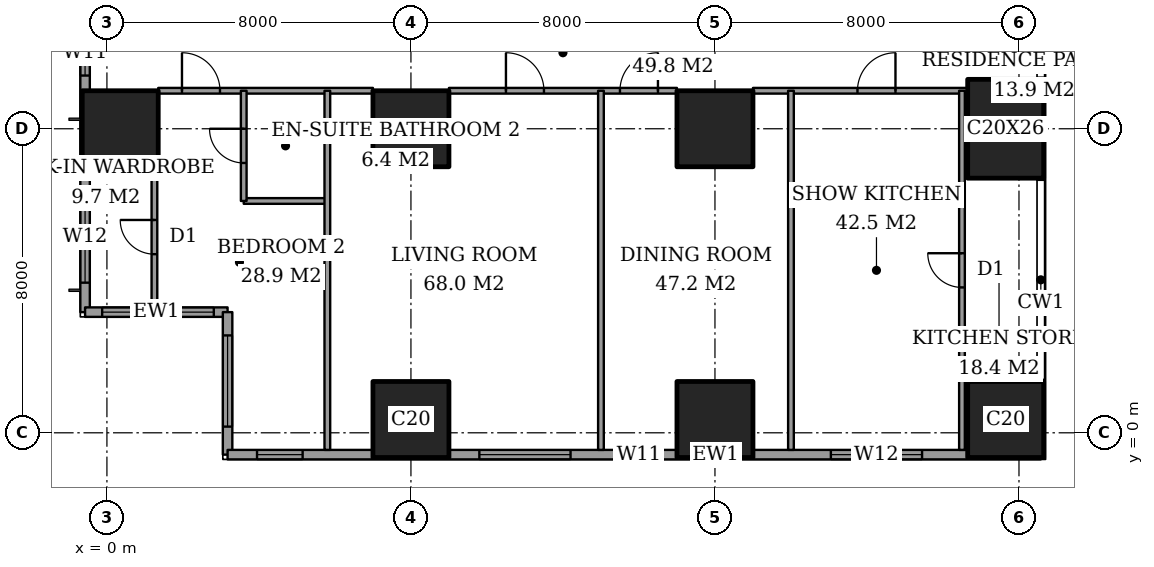
"""IFC4 building model, lengths in metres.
Left out: names, types, materials, properties, quantities, classifications, styles, units other than length and angle.
Written with IfcOpenShell. Run it as: python <this file> out.ifc"""

import sys

from ifc_helpers import new_model, si_unit, direction, frame, frame_2d, origin, origin_2d, place, context, subcontext, project, spatial, rectangle, extrude, element, fill, save


model = new_model("IFC4")
c1 = context("Model", 3, precision=1e-05, world=origin(), true_north=direction((0.0, 1.0)))
c2 = subcontext(c1, "Body", "Model", "MODEL_VIEW")
j1 = project(units=[si_unit("LENGTHUNIT", "METRE"), si_unit("PLANEANGLEUNIT", "RADIAN")], contexts=[c1])
p1 = place(None, origin())
s1 = spatial("IfcSite", under=j1, at=p1, CompositionType="ELEMENT")
p2 = place(p1, origin())
s2 = spatial("IfcBuilding", under=s1, at=p2, CompositionType="ELEMENT")
p3 = place(p2, frame((0.0, 0.0, 146.6)))
s3 = spatial("IfcBuildingStorey", under=s2, at=p3, CompositionType="ELEMENT", Elevation=146.6)
for number, where, z_axis, x_axis in (
    (1, (0.35, 8.0, 0.0), (0.0, 0.0, 1.0), (1.0, 0.0, 0.0)),
    (2, (8.0, 0.35, 0.0), (0.0, 0.0, 1.0), (1.0, 0.0, 0.0)),
    (3, (8.0, 8.0, 0.0), (0.0, 0.0, 1.0), (1.0, 0.0, 0.0)),
    (4, (16.0, 0.35, 0.0), (0.0, 0.0, 1.0), (1.0, 0.0, 0.0)),
    (5, (16.0, 8.0, 0.0), (0.0, 0.0, 1.0), (1.0, 0.0, 0.0)),
    (6, (23.65, 0.35, 0.0), (0.0, 0.0, 1.0), (1.0, 0.0, 0.0)),
):
    element("IfcColumn", number, at=place(p3, frame(where, z_axis=z_axis, x_axis=x_axis)), inside=s3, PredefinedType="COLUMN", context=c2, shape_type="SweptSolid", body=[
        extrude(rectangle(XDim=2.0, YDim=2.0, at=origin_2d()), origin(), (0.0, 0.0, 1.0), 3.6),
    ])
p4 = place(p3, frame((23.65, 8.0, 0.0), z_axis=(0.0, 0.0, 1.0), x_axis=(1.0, 0.0, 0.0)))
e7 = element("IfcColumn", 7, at=p4, inside=s3, PredefinedType="COLUMN", context=c2, shape_type="SweptSolid", body=[
    extrude(rectangle(XDim=2.0, YDim=2.6, at=origin_2d()), origin(), (0.0, 0.0, 1.0), 3.6),
])
p5 = place(p3, frame((-0.575, 44.825, 0.0), z_axis=(0.0, 0.0, 1.0), x_axis=(0.0, -1.0, 0.0)))
e8 = element("IfcWall", 8, at=p5, inside=s3, PredefinedType="SOLIDWALL", context=c2, shape_type="SweptSolid", body=[
    extrude(rectangle(XDim=41.65, YDim=0.25, at=frame_2d((20.825, 0.0))), origin(), (0.0, 0.0, 1.0), 3.6),
])
p6 = place(p5, frame((0.775, 0.0, 0.4)))
e9 = element("IfcOpeningElement", 9, at=p6, cuts=e8, PredefinedType="OPENING", context=c2, shape_type="SweptSolid", body=[
    extrude(rectangle(XDim=2.4, YDim=2.2, at=frame_2d((1.2, 1.1))), frame((0.0, 0.135, 0.0), z_axis=(0.0, -1.0, 0.0), x_axis=(1.0, 0.0, 0.0)), (0.0, 0.0, 1.0), 0.27),
])
p7 = place(p5, frame((6.1, 0.0, 0.4)))
e10 = element("IfcOpeningElement", 10, at=p7, cuts=e8, PredefinedType="OPENING", context=c2, shape_type="SweptSolid", body=[
    extrude(rectangle(XDim=1.2, YDim=2.2, at=frame_2d((0.6, 1.1))), frame((0.0, 0.135, 0.0), z_axis=(0.0, -1.0, 0.0), x_axis=(1.0, 0.0, 0.0)), (0.0, 0.0, 1.0), 0.27),
])
p8 = place(p5, frame((8.425, 0.0, 0.4)))
e11 = element("IfcOpeningElement", 11, at=p8, cuts=e8, PredefinedType="OPENING", context=c2, shape_type="SweptSolid", body=[
    extrude(rectangle(XDim=2.4, YDim=2.2, at=frame_2d((1.2, 1.1))), frame((0.0, 0.135, 0.0), z_axis=(0.0, -1.0, 0.0), x_axis=(1.0, 0.0, 0.0)), (0.0, 0.0, 1.0), 0.27),
])
p9 = place(p5, frame((15.625, 0.0, 0.4)))
e12 = element("IfcOpeningElement", 12, at=p9, cuts=e8, PredefinedType="OPENING", context=c2, shape_type="SweptSolid", body=[
    extrude(rectangle(XDim=2.4, YDim=2.2, at=frame_2d((1.2, 1.1))), frame((0.0, 0.135, 0.0), z_axis=(0.0, -1.0, 0.0), x_axis=(1.0, 0.0, 0.0)), (0.0, 0.0, 1.0), 0.27),
])
p10 = place(p5, frame((23.625, 0.0, 0.4)))
e13 = element("IfcOpeningElement", 13, at=p10, cuts=e8, PredefinedType="OPENING", context=c2, shape_type="SweptSolid", body=[
    extrude(rectangle(XDim=2.4, YDim=2.2, at=frame_2d((1.2, 1.1))), frame((0.0, 0.135, 0.0), z_axis=(0.0, -1.0, 0.0), x_axis=(1.0, 0.0, 0.0)), (0.0, 0.0, 1.0), 0.27),
])
p11 = place(p5, frame((30.625, 0.0, 0.4)))
e14 = element("IfcOpeningElement", 14, at=p11, cuts=e8, PredefinedType="OPENING", context=c2, shape_type="SweptSolid", body=[
    extrude(rectangle(XDim=2.4, YDim=2.2, at=frame_2d((1.2, 1.1))), frame((0.0, 0.135, 0.0), z_axis=(0.0, -1.0, 0.0), x_axis=(1.0, 0.0, 0.0)), (0.0, 0.0, 1.0), 0.27),
])
p12 = place(p5, frame((34.225, 0.0, 0.4)))
e15 = element("IfcOpeningElement", 15, at=p12, cuts=e8, PredefinedType="OPENING", context=c2, shape_type="SweptSolid", body=[
    extrude(rectangle(XDim=1.2, YDim=2.2, at=frame_2d((0.6, 1.1))), frame((0.0, 0.135, 0.0), z_axis=(0.0, -1.0, 0.0), x_axis=(1.0, 0.0, 0.0)), (0.0, 0.0, 1.0), 0.27),
])
p13 = place(p5, frame((38.475, 0.0, 0.4)))
e16 = element("IfcOpeningElement", 16, at=p13, cuts=e8, PredefinedType="OPENING", context=c2, shape_type="SweptSolid", body=[
    extrude(rectangle(XDim=2.4, YDim=2.2, at=frame_2d((1.2, 1.1))), frame((0.0, 0.135, 0.0), z_axis=(0.0, -1.0, 0.0), x_axis=(1.0, 0.0, 0.0)), (0.0, 0.0, 1.0), 0.27),
])
p14 = place(p3, frame((-0.575, 3.175, 0.0), z_axis=(0.0, 0.0, 1.0), x_axis=(1.0, 0.0, 0.0)))
e17 = element("IfcWall", 17, at=p14, inside=s3, PredefinedType="SOLIDWALL", context=c2, shape_type="SweptSolid", body=[
    extrude(rectangle(XDim=3.75, YDim=0.25, at=frame_2d((1.875, 0.0))), origin(), (0.0, 0.0, 1.0), 3.6),
])
p15 = place(p14, frame((0.45, 0.0, 0.4)))
e18 = element("IfcOpeningElement", 18, at=p15, cuts=e17, PredefinedType="OPENING", context=c2, shape_type="SweptSolid", body=[
    extrude(rectangle(XDim=1.2, YDim=2.2, at=frame_2d((0.6, 1.1))), frame((0.0, 0.135, 0.0), z_axis=(0.0, -1.0, 0.0), x_axis=(1.0, 0.0, 0.0)), (0.0, 0.0, 1.0), 0.27),
])
p16 = place(p14, frame((2.188, 0.0, 0.4)))
e19 = element("IfcOpeningElement", 19, at=p16, cuts=e17, PredefinedType="OPENING", context=c2, shape_type="SweptSolid", body=[
    extrude(rectangle(XDim=1.2, YDim=2.2, at=frame_2d((0.6, 1.1))), frame((0.0, 0.135, 0.0), z_axis=(0.0, -1.0, 0.0), x_axis=(1.0, 0.0, 0.0)), (0.0, 0.0, 1.0), 0.27),
])
p17 = place(p3, frame((3.175, 3.175, 0.0), z_axis=(0.0, 0.0, 1.0), x_axis=(0.0, -1.0, 0.0)))
e20 = element("IfcWall", 20, at=p17, inside=s3, PredefinedType="SOLIDWALL", context=c2, shape_type="SweptSolid", body=[
    extrude(rectangle(XDim=3.75, YDim=0.25, at=frame_2d((1.875, 0.0))), origin(), (0.0, 0.0, 1.0), 3.6),
])
p18 = place(p17, frame((0.613, 0.0, 0.4)))
e21 = element("IfcOpeningElement", 21, at=p18, cuts=e20, PredefinedType="OPENING", context=c2, shape_type="SweptSolid", body=[
    extrude(rectangle(XDim=2.4, YDim=2.2, at=frame_2d((1.2, 1.1))), frame((0.0, 0.135, 0.0), z_axis=(0.0, -1.0, 0.0), x_axis=(1.0, 0.0, 0.0)), (0.0, 0.0, 1.0), 0.27),
])
p19 = place(p3, frame((3.175, -0.575, 0.0), z_axis=(0.0, 0.0, 1.0), x_axis=(1.0, 0.0, 0.0)))
e22 = element("IfcWall", 22, at=p19, inside=s3, PredefinedType="SOLIDWALL", context=c2, shape_type="SweptSolid", body=[
    extrude(rectangle(XDim=21.4, YDim=0.25, at=frame_2d((10.7, 0.0))), origin(), (0.0, 0.0, 1.0), 3.6),
])
p20 = place(p19, frame((0.775, 0.0, 0.4)))
e23 = element("IfcOpeningElement", 23, at=p20, cuts=e22, PredefinedType="OPENING", context=c2, shape_type="SweptSolid", body=[
    extrude(rectangle(XDim=1.2, YDim=2.2, at=frame_2d((0.6, 1.1))), frame((0.0, 0.135, 0.0), z_axis=(0.0, -1.0, 0.0), x_axis=(1.0, 0.0, 0.0)), (0.0, 0.0, 1.0), 0.27),
])
p21 = place(p19, frame((6.625, 0.0, 0.4)))
e24 = element("IfcOpeningElement", 24, at=p21, cuts=e22, PredefinedType="OPENING", context=c2, shape_type="SweptSolid", body=[
    extrude(rectangle(XDim=2.4, YDim=2.2, at=frame_2d((1.2, 1.1))), frame((0.0, 0.135, 0.0), z_axis=(0.0, -1.0, 0.0), x_axis=(1.0, 0.0, 0.0)), (0.0, 0.0, 1.0), 0.27),
])
p22 = place(p19, frame((10.225, 0.0, 0.4)))
e25 = element("IfcOpeningElement", 25, at=p22, cuts=e22, PredefinedType="OPENING", context=c2, shape_type="SweptSolid", body=[
    extrude(rectangle(XDim=1.2, YDim=2.2, at=frame_2d((0.6, 1.1))), frame((0.0, 0.135, 0.0), z_axis=(0.0, -1.0, 0.0), x_axis=(1.0, 0.0, 0.0)), (0.0, 0.0, 1.0), 0.27),
])
p23 = place(p19, frame((15.875, 0.0, 0.4)))
e26 = element("IfcOpeningElement", 26, at=p23, cuts=e22, PredefinedType="OPENING", context=c2, shape_type="SweptSolid", body=[
    extrude(rectangle(XDim=2.4, YDim=2.2, at=frame_2d((1.2, 1.1))), frame((0.0, 0.135, 0.0), z_axis=(0.0, -1.0, 0.0), x_axis=(1.0, 0.0, 0.0)), (0.0, 0.0, 1.0), 0.27),
])
p24 = place(p3, frame((3.6, 6.1, 0.0), z_axis=(0.0, 0.0, 1.0), x_axis=(1.0, 0.0, 0.0)))
e27 = element("IfcWall", 27, at=p24, inside=s3, PredefinedType="PARTITIONING", context=c2, shape_type="SweptSolid", body=[
    extrude(rectangle(XDim=2.2, YDim=0.15, at=frame_2d((1.1, 0.0))), origin(), (0.0, 0.0, 1.0), 3.35),
])
p25 = place(p3, frame((1.35, 9.0, 0.0), z_axis=(0.0, 0.0, 1.0), x_axis=(1.0, 0.0, 0.0)))
e28 = element("IfcWall", 28, at=p25, inside=s3, PredefinedType="PARTITIONING", context=c2, shape_type="SweptSolid", body=[
    extrude(rectangle(XDim=5.65, YDim=0.15, at=frame_2d((2.825, 0.0))), origin(), (0.0, 0.0, 1.0), 3.35),
])
p26 = place(p25, frame((0.625, 0.0, 0.0)))
e29 = element("IfcOpeningElement", 29, at=p26, cuts=e28, PredefinedType="OPENING", context=c2, shape_type="SweptSolid", body=[
    extrude(rectangle(XDim=1.0, YDim=2.1, at=frame_2d((0.5, 1.05))), frame((0.0, 0.085, 0.0), z_axis=(0.0, -1.0, 0.0), x_axis=(1.0, 0.0, 0.0)), (0.0, 0.0, 1.0), 0.17),
])
p27 = place(p3, frame((9.0, 9.0, 0.0), z_axis=(0.0, 0.0, 1.0), x_axis=(1.0, 0.0, 0.0)))
e30 = element("IfcWall", 30, at=p27, inside=s3, PredefinedType="PARTITIONING", context=c2, shape_type="SweptSolid", body=[
    extrude(rectangle(XDim=6.0, YDim=0.15, at=frame_2d((3.0, 0.0))), origin(), (0.0, 0.0, 1.0), 3.35),
])
p28 = place(p27, frame((1.5, 0.0, 0.0)))
e31 = element("IfcOpeningElement", 31, at=p28, cuts=e30, PredefinedType="OPENING", context=c2, shape_type="SweptSolid", body=[
    extrude(rectangle(XDim=1.0, YDim=2.1, at=frame_2d((0.5, 1.05))), frame((0.0, 0.085, 0.0), z_axis=(0.0, -1.0, 0.0), x_axis=(1.0, 0.0, 0.0)), (0.0, 0.0, 1.0), 0.17),
])
p29 = place(p27, frame((4.5, 0.0, 0.0)))
e32 = element("IfcOpeningElement", 32, at=p29, cuts=e30, PredefinedType="OPENING", context=c2, shape_type="SweptSolid", body=[
    extrude(rectangle(XDim=1.0, YDim=2.1, at=frame_2d((0.5, 1.05))), frame((0.0, 0.085, 0.0), z_axis=(0.0, -1.0, 0.0), x_axis=(1.0, 0.0, 0.0)), (0.0, 0.0, 1.0), 0.17),
])
p30 = place(p3, frame((17.0, 9.0, 0.0), z_axis=(0.0, 0.0, 1.0), x_axis=(1.0, 0.0, 0.0)))
e33 = element("IfcWall", 33, at=p30, inside=s3, PredefinedType="PARTITIONING", context=c2, shape_type="SweptSolid", body=[
    extrude(rectangle(XDim=5.65, YDim=0.15, at=frame_2d((2.825, 0.0))), origin(), (0.0, 0.0, 1.0), 3.35),
])
p31 = place(p30, frame((2.75, 0.0, 0.0)))
e34 = element("IfcOpeningElement", 34, at=p31, cuts=e33, PredefinedType="OPENING", context=c2, shape_type="SweptSolid", body=[
    extrude(rectangle(XDim=1.0, YDim=2.1, at=frame_2d((0.5, 1.05))), frame((0.0, 0.085, 0.0), z_axis=(0.0, -1.0, 0.0), x_axis=(1.0, 0.0, 0.0)), (0.0, 0.0, 1.0), 0.17),
])
p32 = place(p3, frame((1.25, 3.3, 0.0), z_axis=(0.0, 0.0, 1.0), x_axis=(0.0, 1.0, 0.0)))
e35 = element("IfcWall", 35, at=p32, inside=s3, PredefinedType="PARTITIONING", context=c2, shape_type="SweptSolid", body=[
    extrude(rectangle(XDim=3.7, YDim=0.15, at=frame_2d((1.85, 0.0))), origin(), (0.0, 0.0, 1.0), 3.35),
])
p33 = place(p32, frame((1.4, 0.0, 0.0)))
e36 = element("IfcOpeningElement", 36, at=p33, cuts=e35, PredefinedType="OPENING", context=c2, shape_type="SweptSolid", body=[
    extrude(rectangle(XDim=0.9, YDim=2.1, at=frame_2d((0.45, 1.05))), frame((0.0, 0.085, 0.0), z_axis=(0.0, -1.0, 0.0), x_axis=(1.0, 0.0, 0.0)), (0.0, 0.0, 1.0), 0.17),
])
p34 = place(p3, frame((3.6, 6.1, 0.0), z_axis=(0.0, 0.0, 1.0), x_axis=(0.0, 1.0, 0.0)))
e37 = element("IfcWall", 37, at=p34, inside=s3, PredefinedType="PARTITIONING", context=c2, shape_type="SweptSolid", body=[
    extrude(rectangle(XDim=2.9, YDim=0.15, at=frame_2d((1.45, 0.0))), origin(), (0.0, 0.0, 1.0), 3.35),
])
p35 = place(p34, frame((1.0, 0.0, 0.0)))
e38 = element("IfcOpeningElement", 38, at=p35, cuts=e37, PredefinedType="OPENING", context=c2, shape_type="SweptSolid", body=[
    extrude(rectangle(XDim=0.9, YDim=2.1, at=frame_2d((0.45, 1.05))), frame((0.0, 0.085, 0.0), z_axis=(0.0, -1.0, 0.0), x_axis=(1.0, 0.0, 0.0)), (0.0, 0.0, 1.0), 0.17),
])
for number, where, z_axis, x_axis in (
    (39, (5.8, -0.45, 0.0), (0.0, 0.0, 1.0), (0.0, 1.0, 0.0)),
    (40, (13.0, -0.45, 0.0), (0.0, 0.0, 1.0), (0.0, 1.0, 0.0)),
    (41, (18.0, -0.45, 0.0), (0.0, 0.0, 1.0), (0.0, 1.0, 0.0)),
):
    element("IfcWall", number, at=place(p3, frame(where, z_axis=z_axis, x_axis=x_axis)), inside=s3, PredefinedType="PARTITIONING", context=c2, shape_type="SweptSolid", body=[
        extrude(rectangle(XDim=9.45, YDim=0.15, at=frame_2d((4.725, 0.0))), origin(), (0.0, 0.0, 1.0), 3.35),
    ])
p36 = place(p3, frame((22.5, -0.45, 0.0), z_axis=(0.0, 0.0, 1.0), x_axis=(0.0, 1.0, 0.0)))
e42 = element("IfcWall", 42, at=p36, inside=s3, PredefinedType="PARTITIONING", context=c2, shape_type="SweptSolid", body=[
    extrude(rectangle(XDim=9.45, YDim=0.15, at=frame_2d((4.725, 0.0))), origin(), (0.0, 0.0, 1.0), 3.35),
])
p37 = place(p36, frame((4.275, 0.0, 0.0)))
e43 = element("IfcOpeningElement", 43, at=p37, cuts=e42, PredefinedType="OPENING", context=c2, shape_type="SweptSolid", body=[
    extrude(rectangle(XDim=0.9, YDim=2.1, at=frame_2d((0.45, 1.05))), frame((0.0, 0.085, 0.0), z_axis=(0.0, -1.0, 0.0), x_axis=(1.0, 0.0, 0.0)), (0.0, 0.0, 1.0), 0.17),
])
p38 = place(p12, origin())
e44 = element("IfcWindow", 44, at=p38, inside=s3, PartitioningType="SINGLE_PANEL", PredefinedType="WINDOW", context=c2, shape_type="SweptSolid", body=[
    extrude(rectangle(XDim=1.2, YDim=2.2, at=frame_2d((0.6, 1.1))), frame((0.0, 0.03, 0.0), z_axis=(0.0, -1.0, 0.0), x_axis=(1.0, 0.0, 0.0)), (0.0, 0.0, 1.0), 0.06),
])
fill(e15, e44)
p39 = place(p13, origin())
e45 = element("IfcWindow", 45, at=p39, inside=s3, PartitioningType="SINGLE_PANEL", PredefinedType="WINDOW", context=c2, shape_type="SweptSolid", body=[
    extrude(rectangle(XDim=2.4, YDim=2.2, at=frame_2d((1.2, 1.1))), frame((0.0, 0.03, 0.0), z_axis=(0.0, -1.0, 0.0), x_axis=(1.0, 0.0, 0.0)), (0.0, 0.0, 1.0), 0.06),
])
fill(e16, e45)
p40 = place(p15, origin())
e46 = element("IfcWindow", 46, at=p40, inside=s3, PartitioningType="SINGLE_PANEL", PredefinedType="WINDOW", context=c2, shape_type="SweptSolid", body=[
    extrude(rectangle(XDim=1.2, YDim=2.2, at=frame_2d((0.6, 1.1))), frame((0.0, 0.03, 0.0), z_axis=(0.0, -1.0, 0.0), x_axis=(1.0, 0.0, 0.0)), (0.0, 0.0, 1.0), 0.06),
])
fill(e18, e46)
p41 = place(p16, origin())
e47 = element("IfcWindow", 47, at=p41, inside=s3, PartitioningType="SINGLE_PANEL", PredefinedType="WINDOW", context=c2, shape_type="SweptSolid", body=[
    extrude(rectangle(XDim=1.2, YDim=2.2, at=frame_2d((0.6, 1.1))), frame((0.0, 0.03, 0.0), z_axis=(0.0, -1.0, 0.0), x_axis=(1.0, 0.0, 0.0)), (0.0, 0.0, 1.0), 0.06),
])
fill(e19, e47)
p42 = place(p18, origin())
e48 = element("IfcWindow", 48, at=p42, inside=s3, PartitioningType="SINGLE_PANEL", PredefinedType="WINDOW", context=c2, shape_type="SweptSolid", body=[
    extrude(rectangle(XDim=2.4, YDim=2.2, at=frame_2d((1.2, 1.1))), frame((0.0, 0.03, 0.0), z_axis=(0.0, -1.0, 0.0), x_axis=(1.0, 0.0, 0.0)), (0.0, 0.0, 1.0), 0.06),
])
fill(e21, e48)
p43 = place(p20, origin())
e49 = element("IfcWindow", 49, at=p43, inside=s3, PartitioningType="SINGLE_PANEL", PredefinedType="WINDOW", context=c2, shape_type="SweptSolid", body=[
    extrude(rectangle(XDim=1.2, YDim=2.2, at=frame_2d((0.6, 1.1))), frame((0.0, 0.03, 0.0), z_axis=(0.0, -1.0, 0.0), x_axis=(1.0, 0.0, 0.0)), (0.0, 0.0, 1.0), 0.06),
])
fill(e23, e49)
p44 = place(p21, origin())
e50 = element("IfcWindow", 50, at=p44, inside=s3, PartitioningType="SINGLE_PANEL", PredefinedType="WINDOW", context=c2, shape_type="SweptSolid", body=[
    extrude(rectangle(XDim=2.4, YDim=2.2, at=frame_2d((1.2, 1.1))), frame((0.0, 0.03, 0.0), z_axis=(0.0, -1.0, 0.0), x_axis=(1.0, 0.0, 0.0)), (0.0, 0.0, 1.0), 0.06),
])
fill(e24, e50)
p45 = place(p22, origin())
e51 = element("IfcWindow", 51, at=p45, inside=s3, PartitioningType="SINGLE_PANEL", PredefinedType="WINDOW", context=c2, shape_type="SweptSolid", body=[
    extrude(rectangle(XDim=1.2, YDim=2.2, at=frame_2d((0.6, 1.1))), frame((0.0, 0.03, 0.0), z_axis=(0.0, -1.0, 0.0), x_axis=(1.0, 0.0, 0.0)), (0.0, 0.0, 1.0), 0.06),
])
fill(e25, e51)
p46 = place(p23, origin())
e52 = element("IfcWindow", 52, at=p46, inside=s3, PartitioningType="SINGLE_PANEL", PredefinedType="WINDOW", context=c2, shape_type="SweptSolid", body=[
    extrude(rectangle(XDim=2.4, YDim=2.2, at=frame_2d((1.2, 1.1))), frame((0.0, 0.03, 0.0), z_axis=(0.0, -1.0, 0.0), x_axis=(1.0, 0.0, 0.0)), (0.0, 0.0, 1.0), 0.06),
])
fill(e26, e52)
p47 = place(p33, origin())
e53 = element("IfcDoor", 53, at=p47, inside=s3, OperationType="SINGLE_SWING_LEFT", PredefinedType="DOOR", context=c2, shape_type="SweptSolid", body=[
    extrude(rectangle(XDim=0.9, YDim=2.1, at=frame_2d((0.45, 1.05))), frame((0.0, 0.025, 0.0), z_axis=(0.0, -1.0, 0.0), x_axis=(1.0, 0.0, 0.0)), (0.0, 0.0, 1.0), 0.05),
])
fill(e36, e53)
p48 = place(p35, origin())
e54 = element("IfcDoor", 54, at=p48, inside=s3, OperationType="SINGLE_SWING_LEFT", PredefinedType="DOOR", context=c2, shape_type="SweptSolid", body=[
    extrude(rectangle(XDim=0.9, YDim=2.1, at=frame_2d((0.45, 1.05))), frame((0.0, 0.025, 0.0), z_axis=(0.0, -1.0, 0.0), x_axis=(1.0, 0.0, 0.0)), (0.0, 0.0, 1.0), 0.05),
])
fill(e38, e54)
p49 = place(p26, origin())
e55 = element("IfcDoor", 55, at=p49, inside=s3, OperationType="SINGLE_SWING_RIGHT", PredefinedType="DOOR", context=c2, shape_type="SweptSolid", body=[
    extrude(rectangle(XDim=1.0, YDim=2.1, at=frame_2d((0.5, 1.05))), frame((0.0, 0.025, 0.0), z_axis=(0.0, -1.0, 0.0), x_axis=(1.0, 0.0, 0.0)), (0.0, 0.0, 1.0), 0.05),
])
fill(e29, e55)
p50 = place(p28, origin())
e56 = element("IfcDoor", 56, at=p50, inside=s3, OperationType="SINGLE_SWING_RIGHT", PredefinedType="DOOR", context=c2, shape_type="SweptSolid", body=[
    extrude(rectangle(XDim=1.0, YDim=2.1, at=frame_2d((0.5, 1.05))), frame((0.0, 0.025, 0.0), z_axis=(0.0, -1.0, 0.0), x_axis=(1.0, 0.0, 0.0)), (0.0, 0.0, 1.0), 0.05),
])
fill(e31, e56)
p51 = place(p29, origin())
e57 = element("IfcDoor", 57, at=p51, inside=s3, OperationType="SINGLE_SWING_LEFT", PredefinedType="DOOR", context=c2, shape_type="SweptSolid", body=[
    extrude(rectangle(XDim=1.0, YDim=2.1, at=frame_2d((0.5, 1.05))), frame((0.0, 0.025, 0.0), z_axis=(0.0, -1.0, 0.0), x_axis=(1.0, 0.0, 0.0)), (0.0, 0.0, 1.0), 0.05),
])
fill(e32, e57)
p52 = place(p31, origin())
e58 = element("IfcDoor", 58, at=p52, inside=s3, OperationType="SINGLE_SWING_LEFT", PredefinedType="DOOR", context=c2, shape_type="SweptSolid", body=[
    extrude(rectangle(XDim=1.0, YDim=2.1, at=frame_2d((0.5, 1.05))), frame((0.0, 0.025, 0.0), z_axis=(0.0, -1.0, 0.0), x_axis=(1.0, 0.0, 0.0)), (0.0, 0.0, 1.0), 0.05),
])
fill(e34, e58)
p53 = place(p37, origin())
e59 = element("IfcDoor", 59, at=p53, inside=s3, OperationType="SINGLE_SWING_LEFT", PredefinedType="DOOR", context=c2, shape_type="SweptSolid", body=[
    extrude(rectangle(XDim=0.9, YDim=2.1, at=frame_2d((0.45, 1.05))), frame((0.0, 0.025, 0.0), z_axis=(0.0, -1.0, 0.0), x_axis=(1.0, 0.0, 0.0)), (0.0, 0.0, 1.0), 0.05),
])
fill(e43, e59)
save(model, sys.argv[1])
